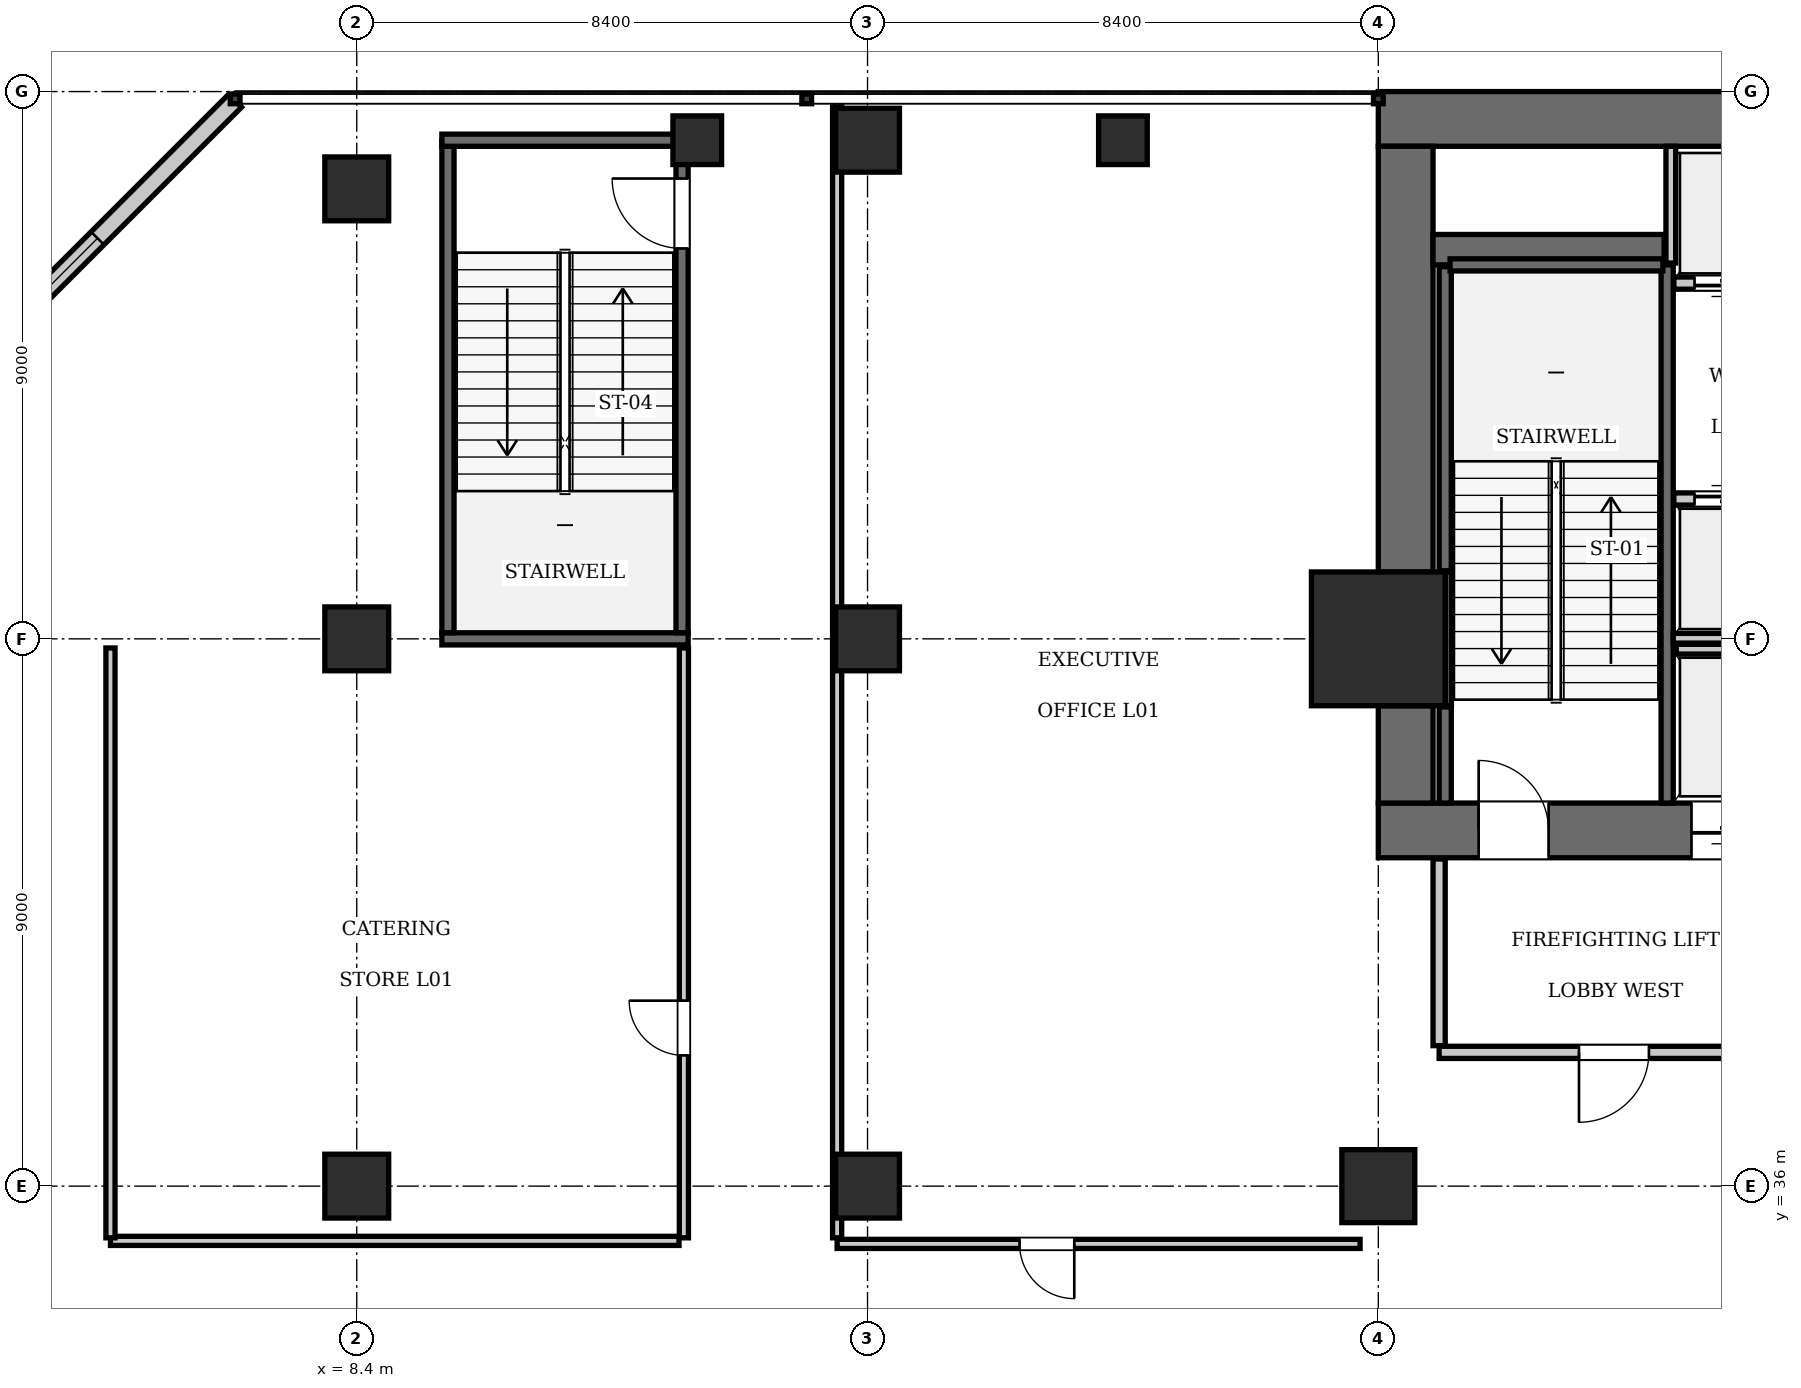
"""IFC4 building model, lengths in metres.
Left out: names, types, materials, properties, quantities, classifications, styles, units other than length and angle.
Written with IfcOpenShell. Run it as: python <this file> out.ifc"""

import sys

from ifc_helpers import new_model, si_unit, direction, frame, frame_2d, origin, origin_2d, place, context, subcontext, project, spatial, rectangle, extrude, element, fill, save


model = new_model("IFC4")
c1 = context("Model", 3, precision=1e-05, world=origin(), true_north=direction((0.0, 1.0)))
c2 = subcontext(c1, "Body", "Model", "MODEL_VIEW")
j1 = project(units=[si_unit("LENGTHUNIT", "METRE"), si_unit("PLANEANGLEUNIT", "RADIAN")], contexts=[c1])
p1 = place(None, origin())
s1 = spatial("IfcSite", under=j1, at=p1, CompositionType="ELEMENT")
p2 = place(p1, origin())
s2 = spatial("IfcBuilding", under=s1, at=p2, CompositionType="ELEMENT")
p3 = place(p2, frame((0.0, 0.0, 5.6)))
s3 = spatial("IfcBuildingStorey", under=s2, at=p3, CompositionType="ELEMENT", Elevation=5.6)
p4 = place(p3, frame((25.2, 45.0, 0.0), z_axis=(0.0, 0.0, 1.0), x_axis=(1.0, 0.0, 0.0)))
e1 = element("IfcColumn", 1, at=p4, inside=s3, PredefinedType="COLUMN", context=c2, shape_type="SweptSolid", body=[
    extrude(rectangle(XDim=2.2, YDim=2.2, at=origin_2d()), origin(), (0.0, 0.0, 1.0), 5.25),
])
p5 = place(p3, frame((25.2, 53.55, 0.0), z_axis=(0.0, 0.0, 1.0), x_axis=(1.0, 0.0, 0.0)))
e2 = element("IfcWall", 2, at=p5, inside=s3, PredefinedType="SHEAR", context=c2, shape_type="SweptSolid", body=[
    extrude(rectangle(XDim=25.2, YDim=0.9, at=frame_2d((12.6, 0.0))), origin(), (0.0, 0.0, 1.0), 5.25),
])
p6 = place(p3, frame((25.2, 41.85, 0.0), z_axis=(0.0, 0.0, 1.0), x_axis=(1.0, 0.0, 0.0)))
e3 = element("IfcWall", 3, at=p6, inside=s3, PredefinedType="SHEAR", context=c2, shape_type="SweptSolid", body=[
    extrude(rectangle(XDim=6.8, YDim=0.9, at=frame_2d((3.4, 0.0))), origin(), (0.0, 0.0, 1.0), 5.25),
])
p7 = place(p6, frame((1.65, 0.0, 0.0)))
e4 = element("IfcOpeningElement", 4, at=p7, cuts=e3, PredefinedType="OPENING", context=c2, shape_type="SweptSolid", body=[
    extrude(rectangle(XDim=1.15, YDim=2.15, at=frame_2d((0.575, 1.075))), frame((0.0, 0.46, 0.0), z_axis=(0.0, -1.0, 0.0), x_axis=(1.0, 0.0, 0.0)), (0.0, 0.0, 1.0), 0.92),
])
p8 = place(p6, frame((5.15, 0.0, 0.0)))
e5 = element("IfcOpeningElement", 5, at=p8, cuts=e3, PredefinedType="OPENING", context=c2, shape_type="SweptSolid", body=[
    extrude(rectangle(XDim=1.1, YDim=2.2, at=frame_2d((0.55, 1.1))), frame((0.0, 0.46, 0.0), z_axis=(0.0, -1.0, 0.0), x_axis=(1.0, 0.0, 0.0)), (0.0, 0.0, 1.0), 0.92),
])
p9 = place(p3, frame((25.65, 42.3, 0.0), z_axis=(0.0, 0.0, 1.0), x_axis=(0.0, 1.0, 0.0)))
e6 = element("IfcWall", 6, at=p9, inside=s3, PredefinedType="SHEAR", context=c2, shape_type="SweptSolid", body=[
    extrude(rectangle(XDim=1.6, YDim=0.9, at=frame_2d((0.8, 0.0))), origin(), (0.0, 0.0, 1.0), 5.25),
])
p10 = place(p3, frame((25.65, 46.1, 0.0), z_axis=(0.0, 0.0, 1.0), x_axis=(0.0, 1.0, 0.0)))
e7 = element("IfcWall", 7, at=p10, inside=s3, PredefinedType="SHEAR", context=c2, shape_type="SweptSolid", body=[
    extrude(rectangle(XDim=7.0, YDim=0.9, at=frame_2d((3.5, 0.0))), origin(), (0.0, 0.0, 1.0), 5.25),
])
p11 = place(p3, frame((26.1, 51.4, 0.0), z_axis=(0.0, 0.0, 1.0), x_axis=(1.0, 0.0, 0.0)))
e8 = element("IfcWall", 8, at=p11, inside=s3, PredefinedType="SHEAR", context=c2, shape_type="SweptSolid", body=[
    extrude(rectangle(XDim=3.8, YDim=0.5, at=frame_2d((1.9, 0.0))), origin(), (0.0, 0.0, 1.0), 5.25),
])
p12 = place(p3, frame((25.2, 36.0, 0.0), z_axis=(0.0, 0.0, 1.0), x_axis=(1.0, 0.0, 0.0)))
e9 = element("IfcColumn", 9, at=p12, inside=s3, PredefinedType="COLUMN", context=c2, shape_type="SweptSolid", body=[
    extrude(rectangle(XDim=1.2, YDim=1.2, at=origin_2d()), origin(), (0.0, 0.0, 1.0), 5.25),
])
for number, where, z_axis, x_axis in (
    (10, (16.8, 36.0, 0.0), (0.0, 0.0, 1.0), (1.0, 0.0, 0.0)),
    (11, (16.8, 45.0, 0.0), (0.0, 0.0, 1.0), (1.0, 0.0, 0.0)),
    (12, (8.4, 36.0, 0.0), (0.0, 0.0, 1.0), (1.0, 0.0, 0.0)),
    (13, (8.4, 45.0, 0.0), (0.0, 0.0, 1.0), (1.0, 0.0, 0.0)),
    (14, (8.4, 52.4, 0.0), (0.0, 0.0, 1.0), (1.0, 0.0, 0.0)),
    (15, (16.8, 53.2, 0.0), (0.0, 0.0, 1.0), (1.0, 0.0, 0.0)),
):
    element("IfcColumn", number, at=place(p3, frame(where, z_axis=z_axis, x_axis=x_axis)), inside=s3, PredefinedType="COLUMN", context=c2, shape_type="SweptSolid", body=[
        extrude(rectangle(XDim=1.05, YDim=1.05, at=origin_2d()), origin(), (0.0, 0.0, 1.0), 5.25),
    ])
for number, where, z_axis, x_axis in (
    (16, (14.0, 53.2, 0.0), (0.0, 0.0, 1.0), (1.0, 0.0, 0.0)),
    (17, (21.0, 53.2, 0.0), (0.0, 0.0, 1.0), (1.0, 0.0, 0.0)),
):
    element("IfcColumn", number, at=place(p3, frame(where, z_axis=z_axis, x_axis=x_axis)), inside=s3, PredefinedType="PILASTER", context=c2, shape_type="SweptSolid", body=[
        extrude(rectangle(XDim=0.8, YDim=0.8, at=origin_2d()), origin(), (0.0, 0.0, 1.0), 5.25),
    ])
p13 = place(p3, frame((29.95, 42.3, 0.0), z_axis=(0.0, 0.0, 1.0), x_axis=(0.0, 1.0, 0.0)))
e18 = element("IfcWall", 18, at=p13, inside=s3, PredefinedType="SOLIDWALL", context=c2, shape_type="SweptSolid", body=[
    extrude(rectangle(XDim=8.85, YDim=0.2, at=frame_2d((4.425, 0.0))), origin(), (0.0, 0.0, 1.0), 4.97),
])
p14 = place(p3, frame((26.3, 42.3, 0.0), z_axis=(0.0, 0.0, 1.0), x_axis=(0.0, 1.0, 0.0)))
e19 = element("IfcWall", 19, at=p14, inside=s3, PredefinedType="SOLIDWALL", context=c2, shape_type="SweptSolid", body=[
    extrude(rectangle(XDim=1.58, YDim=0.2, at=frame_2d((0.79, 0.0))), origin(), (0.0, 0.0, 1.0), 4.97),
])
p15 = place(p3, frame((26.3, 46.12, 0.0), z_axis=(0.0, 0.0, 1.0), x_axis=(0.0, 1.0, 0.0)))
e20 = element("IfcWall", 20, at=p15, inside=s3, PredefinedType="SOLIDWALL", context=c2, shape_type="SweptSolid", body=[
    extrude(rectangle(XDim=5.0, YDim=0.2, at=frame_2d((2.5, 0.0))), origin(), (0.0, 0.0, 1.0), 4.97),
])
p16 = place(p3, frame((26.38, 51.15, 0.0), z_axis=(0.0, 0.0, 1.0), x_axis=(1.0, 0.0, 0.0)))
e21 = element("IfcWall", 21, at=p16, inside=s3, PredefinedType="SOLIDWALL", context=c2, shape_type="SweptSolid", body=[
    extrude(rectangle(XDim=3.5, YDim=0.2, at=frame_2d((1.75, 0.0))), origin(), (0.0, 0.0, 1.0), 4.97),
])
p17 = place(p3, frame((26.352, 43.9, 0.0), z_axis=(0.0, 0.0, 1.0), x_axis=(0.0, 1.0, 0.0)))
e22 = element("IfcWall", 22, at=p17, inside=s3, PredefinedType="SOLIDWALL", context=c2, shape_type="SweptSolid", body=[
    extrude(rectangle(XDim=2.2, YDim=0.1, at=frame_2d((1.1, 0.0))), origin(), (0.0, 0.0, 1.0), 4.97),
])
p18 = place(p3, frame((9.8, 45.0, 0.0), z_axis=(0.0, 0.0, 1.0), x_axis=(1.0, 0.0, 0.0)))
e23 = element("IfcWall", 23, at=p18, inside=s3, PredefinedType="SOLIDWALL", context=c2, shape_type="SweptSolid", body=[
    extrude(rectangle(XDim=4.05, YDim=0.2, at=frame_2d((2.025, 0.0))), origin(), (0.0, 0.0, 1.0), 4.335),
])
p19 = place(p3, frame((9.9, 45.1, 0.0), z_axis=(0.0, 0.0, 1.0), x_axis=(0.0, 1.0, 0.0)))
e24 = element("IfcWall", 24, at=p19, inside=s3, PredefinedType="SOLIDWALL", context=c2, shape_type="SweptSolid", body=[
    extrude(rectangle(XDim=8.1, YDim=0.2, at=frame_2d((4.05, 0.0))), origin(), (0.0, 0.0, 1.0), 4.97),
])
p20 = place(p3, frame((13.75, 45.1, 0.0), z_axis=(0.0, 0.0, 1.0), x_axis=(0.0, 1.0, 0.0)))
e25 = element("IfcWall", 25, at=p20, inside=s3, PredefinedType="SOLIDWALL", context=c2, shape_type="SweptSolid", body=[
    extrude(rectangle(XDim=8.1, YDim=0.2, at=frame_2d((4.05, 0.0))), origin(), (0.0, 0.0, 1.0), 4.97),
])
p21 = place(p20, frame((6.32, 0.0, 0.0)))
e26 = element("IfcOpeningElement", 26, at=p21, cuts=e25, PredefinedType="OPENING", context=c2, shape_type="SweptSolid", body=[
    extrude(rectangle(XDim=1.15, YDim=2.15, at=frame_2d((0.575, 1.075))), frame((0.0, 0.11, 0.0), z_axis=(0.0, -1.0, 0.0), x_axis=(1.0, 0.0, 0.0)), (0.0, 0.0, 1.0), 0.22),
])
p22 = place(p3, frame((9.8, 53.2, 0.0), z_axis=(0.0, 0.0, 1.0), x_axis=(1.0, 0.0, 0.0)))
e27 = element("IfcWall", 27, at=p22, inside=s3, PredefinedType="SOLIDWALL", context=c2, shape_type="SweptSolid", body=[
    extrude(rectangle(XDim=4.05, YDim=0.2, at=frame_2d((2.025, 0.0))), origin(), (0.0, 0.0, 1.0), 4.97),
])
p23 = place(p3, frame((30.06, 47.3, 0.0), z_axis=(0.0, 0.0, 1.0), x_axis=(1.0, 0.0, 0.0)))
e28 = element("IfcWall", 28, at=p23, inside=s3, PredefinedType="SOLIDWALL", context=c2, shape_type="SweptSolid", body=[
    extrude(rectangle(XDim=1.68, YDim=0.2, at=frame_2d((0.84, 0.0))), origin(), (0.0, 0.0, 1.0), 4.97),
])
p24 = place(p23, frame((0.34, 0.0, 0.0)))
e29 = element("IfcOpeningElement", 29, at=p24, cuts=e28, PredefinedType="OPENING", context=c2, shape_type="SweptSolid", body=[
    extrude(rectangle(XDim=1.0, YDim=2.15, at=frame_2d((0.5, 1.075))), frame((0.0, 0.11, 0.0), z_axis=(0.0, -1.0, 0.0), x_axis=(1.0, 0.0, 0.0)), (0.0, 0.0, 1.0), 0.22),
])
p25 = place(p3, frame((30.06, 50.85, 0.0), z_axis=(0.0, 0.0, 1.0), x_axis=(1.0, 0.0, 0.0)))
e30 = element("IfcWall", 30, at=p25, inside=s3, PredefinedType="SOLIDWALL", context=c2, shape_type="SweptSolid", body=[
    extrude(rectangle(XDim=1.68, YDim=0.2, at=frame_2d((0.84, 0.0))), origin(), (0.0, 0.0, 1.0), 4.97),
])
p26 = place(p25, frame((0.34, 0.0, 0.0)))
e31 = element("IfcOpeningElement", 31, at=p26, cuts=e30, PredefinedType="OPENING", context=c2, shape_type="SweptSolid", body=[
    extrude(rectangle(XDim=1.0, YDim=2.15, at=frame_2d((0.5, 1.075))), frame((0.0, 0.11, 0.0), z_axis=(0.0, -1.0, 0.0), x_axis=(1.0, 0.0, 0.0)), (0.0, 0.0, 1.0), 0.22),
])
p27 = place(p3, frame((30.1, 44.83, 0.0), z_axis=(0.0, 0.0, 1.0), x_axis=(1.0, 0.0, 0.0)))
e32 = element("IfcWall", 32, at=p27, inside=s3, PredefinedType="SOLIDWALL", context=c2, shape_type="SweptSolid", body=[
    extrude(rectangle(XDim=1.6, YDim=0.16, at=frame_2d((0.8, 0.0))), origin(), (0.0, 0.0, 1.0), 4.97),
])
p28 = place(p3, frame((30.05, 45.01, 0.0), z_axis=(0.0, 0.0, 1.0), x_axis=(1.0, 0.0, 0.0)))
e33 = element("IfcWall", 33, at=p28, inside=s3, PredefinedType="SOLIDWALL", context=c2, shape_type="SweptSolid", body=[
    extrude(rectangle(XDim=3.45, YDim=0.16, at=frame_2d((1.725, 0.0))), origin(), (0.0, 0.0, 1.0), 4.97),
])
p29 = place(p3, frame((30.01, 51.18, 0.0), z_axis=(0.0, 0.0, 1.0), x_axis=(0.0, 1.0, 0.0)))
e34 = element("IfcWall", 34, at=p29, inside=s3, PredefinedType="SOLIDWALL", context=c2, shape_type="SweptSolid", body=[
    extrude(rectangle(XDim=1.92, YDim=0.16, at=frame_2d((0.96, 0.0))), origin(), (0.0, 0.0, 1.0), 4.97),
])
p30 = place(p3, frame((6.4, 53.85, 0.0), z_axis=(0.0, 0.0, 1.0), x_axis=(-0.707106781187, -0.707106781187, 0.0)))
e35 = element("IfcWall", 35, at=p30, inside=s3, PredefinedType="SOLIDWALL", context=c2, shape_type="SweptSolid", body=[
    extrude(rectangle(XDim=8.839, YDim=0.3, at=frame_2d((4.419, 0.0))), origin(), (0.0, 0.0, 1.0), 4.97),
])
p31 = place(p30, frame((3.2, 0.0, 0.9)))
e36 = element("IfcOpeningElement", 36, at=p31, cuts=e35, PredefinedType="OPENING", context=c2, shape_type="SweptSolid", body=[
    extrude(rectangle(XDim=2.4, YDim=2.6, at=frame_2d((1.2, 1.3))), frame((0.0, 0.16, 0.0), z_axis=(0.0, -1.0, 0.0), x_axis=(1.0, 0.0, 0.0)), (0.0, 0.0, 1.0), 0.32),
])
p32 = place(p3, frame((26.2, 38.2, 0.0), z_axis=(0.0, 0.0, 1.0), x_axis=(1.0, 0.0, 0.0)))
e37 = element("IfcWall", 37, at=p32, inside=s3, PredefinedType="PARTITIONING", context=c2, shape_type="SweptSolid", body=[
    extrude(rectangle(XDim=5.8, YDim=0.2, at=frame_2d((2.9, 0.0))), origin(), (0.0, 0.0, 1.0), 4.97),
])
p33 = place(p32, frame((2.3, 0.0, 0.0)))
e38 = element("IfcOpeningElement", 38, at=p33, cuts=e37, PredefinedType="OPENING", context=c2, shape_type="SweptSolid", body=[
    extrude(rectangle(XDim=1.15, YDim=2.15, at=frame_2d((0.575, 1.075))), frame((0.0, 0.11, 0.0), z_axis=(0.0, -1.0, 0.0), x_axis=(1.0, 0.0, 0.0)), (0.0, 0.0, 1.0), 0.22),
])
p34 = place(p3, frame((26.2, 38.31, 0.0), z_axis=(0.0, 0.0, 1.0), x_axis=(0.0, 1.0, 0.0)))
e39 = element("IfcWall", 39, at=p34, inside=s3, PredefinedType="PARTITIONING", context=c2, shape_type="SweptSolid", body=[
    extrude(rectangle(XDim=3.07, YDim=0.2, at=frame_2d((1.535, 0.0))), origin(), (0.0, 0.0, 1.0), 4.97),
])
p35 = place(p3, frame((16.3, 35.05, 0.0), z_axis=(0.0, 0.0, 1.0), x_axis=(1.0, 0.0, 0.0)))
e40 = element("IfcWall", 40, at=p35, inside=s3, PredefinedType="PARTITIONING", context=c2, shape_type="SweptSolid", body=[
    extrude(rectangle(XDim=8.6, YDim=0.15, at=frame_2d((4.3, 0.0))), origin(), (0.0, 0.0, 1.0), 4.97),
])
p36 = place(p35, frame((3.0, 0.0, 0.0)))
e41 = element("IfcOpeningElement", 41, at=p36, cuts=e40, PredefinedType="OPENING", context=c2, shape_type="SweptSolid", body=[
    extrude(rectangle(XDim=0.9, YDim=2.1, at=frame_2d((0.45, 1.05))), frame((0.0, 0.085, 0.0), z_axis=(0.0, -1.0, 0.0), x_axis=(1.0, 0.0, 0.0)), (0.0, 0.0, 1.0), 0.17),
])
p37 = place(p3, frame((16.3, 35.15, 0.0), z_axis=(0.0, 0.0, 1.0), x_axis=(0.0, 1.0, 0.0)))
e42 = element("IfcWall", 42, at=p37, inside=s3, PredefinedType="PARTITIONING", context=c2, shape_type="SweptSolid", body=[
    extrude(rectangle(XDim=18.6, YDim=0.15, at=frame_2d((9.3, 0.0))), origin(), (0.0, 0.0, 1.0), 4.97),
])
p38 = place(p3, frame((13.78, 35.15, 0.0), z_axis=(0.0, 0.0, 1.0), x_axis=(0.0, 1.0, 0.0)))
e43 = element("IfcWall", 43, at=p38, inside=s3, PredefinedType="PARTITIONING", context=c2, shape_type="SweptSolid", body=[
    extrude(rectangle(XDim=9.7, YDim=0.15, at=frame_2d((4.85, 0.0))), origin(), (0.0, 0.0, 1.0), 4.97),
])
p39 = place(p38, frame((3.0, 0.0, 0.0)))
e44 = element("IfcOpeningElement", 44, at=p39, cuts=e43, PredefinedType="OPENING", context=c2, shape_type="SweptSolid", body=[
    extrude(rectangle(XDim=0.9, YDim=2.1, at=frame_2d((0.45, 1.05))), frame((0.0, 0.085, 0.0), z_axis=(0.0, -1.0, 0.0), x_axis=(1.0, 0.0, 0.0)), (0.0, 0.0, 1.0), 0.17),
])
p40 = place(p3, frame((4.35, 35.1, 0.0), z_axis=(0.0, 0.0, 1.0), x_axis=(1.0, 0.0, 0.0)))
e45 = element("IfcWall", 45, at=p40, inside=s3, PredefinedType="PARTITIONING", context=c2, shape_type="SweptSolid", body=[
    extrude(rectangle(XDim=9.35, YDim=0.15, at=frame_2d((4.675, 0.0))), origin(), (0.0, 0.0, 1.0), 4.97),
])
p41 = place(p3, frame((4.35, 35.15, 0.0), z_axis=(0.0, 0.0, 1.0), x_axis=(0.0, 1.0, 0.0)))
e46 = element("IfcWall", 46, at=p41, inside=s3, PredefinedType="PARTITIONING", context=c2, shape_type="SweptSolid", body=[
    extrude(rectangle(XDim=9.7, YDim=0.15, at=frame_2d((4.85, 0.0))), origin(), (0.0, 0.0, 1.0), 4.97),
])
p42 = place(p7, origin())
e47 = element("IfcDoor", 47, at=p42, inside=s3, OperationType="SINGLE_SWING_LEFT", PredefinedType="DOOR", context=c2, shape_type="SweptSolid", body=[
    extrude(rectangle(XDim=1.15, YDim=2.15, at=frame_2d((0.575, 1.075))), frame((0.0, 0.025, 0.0), z_axis=(0.0, -1.0, 0.0), x_axis=(1.0, 0.0, 0.0)), (0.0, 0.0, 1.0), 0.05),
])
fill(e4, e47)
p43 = place(p21, origin())
e48 = element("IfcDoor", 48, at=p43, inside=s3, OperationType="SINGLE_SWING_RIGHT", PredefinedType="DOOR", context=c2, shape_type="SweptSolid", body=[
    extrude(rectangle(XDim=1.15, YDim=2.15, at=frame_2d((0.575, 1.075))), frame((0.0, 0.025, 0.0), z_axis=(0.0, -1.0, 0.0), x_axis=(1.0, 0.0, 0.0)), (0.0, 0.0, 1.0), 0.05),
])
fill(e26, e48)
p44 = place(p24, origin())
e49 = element("IfcDoor", 49, at=p44, inside=s3, OperationType="SLIDING_TO_LEFT", PredefinedType="DOOR", context=c2, shape_type="SweptSolid", body=[
    extrude(rectangle(XDim=1.0, YDim=2.15, at=frame_2d((0.5, 1.075))), frame((0.0, 0.025, 0.0), z_axis=(0.0, -1.0, 0.0), x_axis=(1.0, 0.0, 0.0)), (0.0, 0.0, 1.0), 0.05),
])
fill(e29, e49)
p45 = place(p26, frame((1.0, 0.0, 0.0), z_axis=(0.0, 0.0, 1.0), x_axis=(-1.0, 0.0, 0.0)))
e50 = element("IfcDoor", 50, at=p45, inside=s3, OperationType="SLIDING_TO_LEFT", PredefinedType="DOOR", context=c2, shape_type="SweptSolid", body=[
    extrude(rectangle(XDim=1.0, YDim=2.15, at=frame_2d((0.5, 1.075))), frame((0.0, 0.025, 0.0), z_axis=(0.0, -1.0, 0.0), x_axis=(1.0, 0.0, 0.0)), (0.0, 0.0, 1.0), 0.05),
])
fill(e31, e50)
p46 = place(p8, frame((1.1, 0.0, 0.0), z_axis=(0.0, 0.0, 1.0), x_axis=(-1.0, 0.0, 0.0)))
e51 = element("IfcDoor", 51, at=p46, inside=s3, OperationType="SLIDING_TO_LEFT", PredefinedType="DOOR", context=c2, shape_type="SweptSolid", body=[
    extrude(rectangle(XDim=1.1, YDim=2.2, at=frame_2d((0.55, 1.1))), frame((0.0, 0.025, 0.0), z_axis=(0.0, -1.0, 0.0), x_axis=(1.0, 0.0, 0.0)), (0.0, 0.0, 1.0), 0.05),
])
fill(e5, e51)
p47 = place(p31, origin())
e52 = element("IfcWindow", 52, at=p47, inside=s3, PartitioningType="SINGLE_PANEL", PredefinedType="WINDOW", context=c2, shape_type="SweptSolid", body=[
    extrude(rectangle(XDim=2.4, YDim=2.6, at=frame_2d((1.2, 1.3))), frame((0.0, 0.03, 0.0), z_axis=(0.0, -1.0, 0.0), x_axis=(1.0, 0.0, 0.0)), (0.0, 0.0, 1.0), 0.06),
])
fill(e36, e52)
p48 = place(p33, frame((1.15, 0.0, 0.0), z_axis=(0.0, 0.0, 1.0), x_axis=(-1.0, 0.0, 0.0)))
e53 = element("IfcDoor", 53, at=p48, inside=s3, OperationType="SINGLE_SWING_RIGHT", PredefinedType="DOOR", context=c2, shape_type="SweptSolid", body=[
    extrude(rectangle(XDim=1.15, YDim=2.15, at=frame_2d((0.575, 1.075))), frame((0.0, 0.025, 0.0), z_axis=(0.0, -1.0, 0.0), x_axis=(1.0, 0.0, 0.0)), (0.0, 0.0, 1.0), 0.05),
])
fill(e38, e53)
p49 = place(p36, frame((0.9, 0.0, 0.0), z_axis=(0.0, 0.0, 1.0), x_axis=(-1.0, 0.0, 0.0)))
e54 = element("IfcDoor", 54, at=p49, inside=s3, OperationType="SINGLE_SWING_LEFT", PredefinedType="DOOR", context=c2, shape_type="SweptSolid", body=[
    extrude(rectangle(XDim=0.9, YDim=2.1, at=frame_2d((0.45, 1.05))), frame((0.0, 0.025, 0.0), z_axis=(0.0, -1.0, 0.0), x_axis=(1.0, 0.0, 0.0)), (0.0, 0.0, 1.0), 0.05),
])
fill(e41, e54)
p50 = place(p39, origin())
e55 = element("IfcDoor", 55, at=p50, inside=s3, OperationType="SINGLE_SWING_RIGHT", PredefinedType="DOOR", context=c2, shape_type="SweptSolid", body=[
    extrude(rectangle(XDim=0.9, YDim=2.1, at=frame_2d((0.45, 1.05))), frame((0.0, 0.025, 0.0), z_axis=(0.0, -1.0, 0.0), x_axis=(1.0, 0.0, 0.0)), (0.0, 0.0, 1.0), 0.05),
])
fill(e44, e55)
save(model, sys.argv[1])
